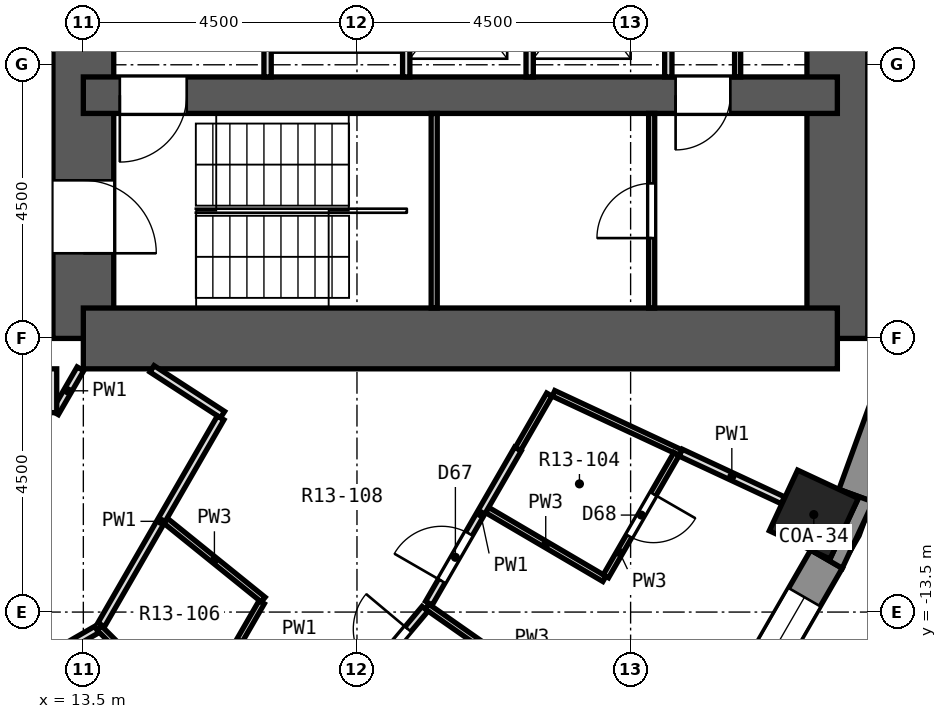
"""IFC4 building model, lengths in metres.
Left out: names, types, materials, properties, quantities, classifications, styles, units other than length and angle.
Written with IfcOpenShell. Run it as: python <this file> out.ifc"""

import sys

from ifc_helpers import new_model, si_unit, direction, frame, frame_2d, origin, origin_2d, place, context, subcontext, project, spatial, polyline, rectangle, outline, extrude, element, fill, save


model = new_model("IFC4")
c1 = context("Model", 3, precision=1e-05, world=origin(), true_north=direction((0.0, 1.0)))
c2 = subcontext(c1, "Body", "Model", "MODEL_VIEW")
j1 = project(units=[si_unit("LENGTHUNIT", "METRE"), si_unit("PLANEANGLEUNIT", "RADIAN")], contexts=[c1])
p1 = place(None, origin())
s1 = spatial("IfcSite", under=j1, at=p1, CompositionType="ELEMENT")
p2 = place(p1, origin())
s2 = spatial("IfcBuilding", under=s1, at=p2, CompositionType="ELEMENT")
p3 = place(p2, frame((0.0, 0.0, 65.9)))
s3 = spatial("IfcBuildingStorey", under=s2, at=p3, CompositionType="ELEMENT", Elevation=65.9)
p4 = place(p3, frame((25.512, -11.897, 0.0), z_axis=(0.0, 0.0, 1.0), x_axis=(0.906307787037, -0.422618261741, 0.0)))
e1 = element("IfcColumn", 1, at=p4, inside=s3, PredefinedType="COLUMN", context=c2, shape_type="SweptSolid", body=[
    extrude(rectangle(XDim=1.1, YDim=1.1, at=origin_2d()), origin(), (0.0, 0.0, 1.0), 3.3),
])
p5 = place(p3, frame((13.5, -9.0, 0.0), z_axis=(0.0, 0.0, 1.0), x_axis=(0.0, 1.0, 0.0)))
e2 = element("IfcWall", 2, at=p5, inside=s3, PredefinedType="SHEAR", context=c2, shape_type="SweptSolid", body=[
    extrude(rectangle(XDim=18.0, YDim=1.0, at=frame_2d((9.0, 0.0))), origin(), (0.0, 0.0, 1.0), 3.3),
])
p6 = place(p5, frame((15.4, 0.0, 0.0)))
e3 = element("IfcOpeningElement", 3, at=p6, cuts=e2, PredefinedType="OPENING", context=c2, shape_type="SweptSolid", body=[
    extrude(rectangle(XDim=1.2, YDim=2.1, at=frame_2d((0.6, 1.05))), frame((0.0, 0.512, 0.0), z_axis=(0.0, -1.0, 0.0), x_axis=(1.0, 0.0, 0.0)), (0.0, 0.0, 1.0), 1.024),
])
p7 = place(p5, frame((1.4, 0.0, 0.0)))
e4 = element("IfcOpeningElement", 4, at=p7, cuts=e2, PredefinedType="OPENING", context=c2, shape_type="SweptSolid", body=[
    extrude(rectangle(XDim=1.2, YDim=2.1, at=frame_2d((0.6, 1.05))), frame((0.0, 0.512, 0.0), z_axis=(0.0, -1.0, 0.0), x_axis=(1.0, 0.0, 0.0)), (0.0, 0.0, 1.0), 1.024),
])
p8 = place(p5, frame((7.5, 0.0, 0.0)))
e5 = element("IfcOpeningElement", 5, at=p8, cuts=e2, PredefinedType="OPENING", context=c2, shape_type="SweptSolid", body=[
    extrude(rectangle(XDim=3.0, YDim=2.4, at=frame_2d((1.5, 1.2))), frame((0.0, 0.512, 0.0), z_axis=(0.0, -1.0, 0.0), x_axis=(1.0, 0.0, 0.0)), (0.0, 0.0, 1.0), 1.024),
])
p9 = place(p3, frame((25.9, -9.0, 0.0), z_axis=(0.0, 0.0, 1.0), x_axis=(0.0, 1.0, 0.0)))
e6 = element("IfcWall", 6, at=p9, inside=s3, PredefinedType="SHEAR", context=c2, shape_type="SweptSolid", body=[
    extrude(rectangle(XDim=18.0, YDim=1.0, at=frame_2d((9.0, 0.0))), origin(), (0.0, 0.0, 1.0), 3.3),
])
p10 = place(p3, frame((13.5, -9.0, 0.0), z_axis=(0.0, 0.0, 1.0), x_axis=(1.0, 0.0, 0.0)))
e7 = element("IfcWall", 7, at=p10, inside=s3, PredefinedType="SHEAR", context=c2, shape_type="SweptSolid", body=[
    extrude(rectangle(XDim=12.4, YDim=1.0, at=frame_2d((6.2, 0.0))), origin(), (0.0, 0.0, 1.0), 3.3),
])
p11 = place(p3, frame((13.5, -5.0, 0.0), z_axis=(0.0, 0.0, 1.0), x_axis=(1.0, 0.0, 0.0)))
e8 = element("IfcWall", 8, at=p11, inside=s3, PredefinedType="SHEAR", context=c2, shape_type="SweptSolid", body=[
    extrude(rectangle(XDim=12.4, YDim=0.6, at=frame_2d((6.2, 0.0))), origin(), (0.0, 0.0, 1.0), 3.3),
])
p12 = place(p11, frame((9.74, 0.0, 0.0)))
e9 = element("IfcOpeningElement", 9, at=p12, cuts=e8, PredefinedType="OPENING", context=c2, shape_type="SweptSolid", body=[
    extrude(rectangle(XDim=0.9, YDim=2.1, at=frame_2d((0.45, 1.05))), frame((0.0, 0.312, 0.0), z_axis=(0.0, -1.0, 0.0), x_axis=(1.0, 0.0, 0.0)), (0.0, 0.0, 1.0), 0.624),
])
p13 = place(p11, frame((0.6, 0.0, 0.0)))
e10 = element("IfcOpeningElement", 10, at=p13, cuts=e8, PredefinedType="OPENING", context=c2, shape_type="SweptSolid", body=[
    extrude(rectangle(XDim=1.1, YDim=2.1, at=frame_2d((0.55, 1.05))), frame((0.0, 0.312, 0.0), z_axis=(0.0, -1.0, 0.0), x_axis=(1.0, 0.0, 0.0)), (0.0, 0.0, 1.0), 0.624),
])
p14 = place(p3, frame((23.798, -15.96, 0.0), z_axis=(0.0, 0.0, 1.0), x_axis=(0.499989888488, 0.86603124159, 0.0)))
e11 = element("IfcWall", 11, at=p14, inside=s3, PredefinedType="SOLIDWALL", context=c2, shape_type="SweptSolid", body=[
    extrude(rectangle(XDim=3.846, YDim=0.6, at=frame_2d((1.923, 0.0))), origin(), (0.0, 0.0, 1.0), 2.75),
])
p15 = place(p14, frame((0.723, 0.0, 0.9)))
e12 = element("IfcOpeningElement", 12, at=p15, cuts=e11, PredefinedType="OPENING", context=c2, shape_type="SweptSolid", body=[
    extrude(rectangle(XDim=2.4, YDim=1.8, at=frame_2d((1.2, 0.9))), frame((0.0, 0.312, 0.0), z_axis=(0.0, -1.0, 0.0), x_axis=(1.0, 0.0, 0.0)), (0.0, 0.0, 1.0), 0.624),
])
p16 = place(p3, frame((26.208, -11.585, 0.0), z_axis=(0.0, 0.0, 1.0), x_axis=(0.342028474173, 0.939689588564, 0.0)))
e13 = element("IfcWall", 13, at=p16, inside=s3, PredefinedType="SOLIDWALL", context=c2, shape_type="SweptSolid", body=[
    extrude(rectangle(XDim=3.846, YDim=0.6, at=frame_2d((1.923, 0.0))), origin(), (0.0, 0.0, 1.0), 2.75),
])
p17 = place(p3, origin())
e14 = element("IfcWall", 14, at=p17, inside=s3, PredefinedType="SOLIDWALL", context=c2, shape_type="SweptSolid", body=[
    extrude(outline(polyline([(26.49, -11.688), (25.926, -11.483), (26.243, -11.631), (25.779, -12.628), (25.461, -12.479), (25.981, -12.78), (26.49, -11.688)])), origin(), (0.0, 0.0, 1.0), 2.75),
])
p18 = place(p3, frame((13.763, -13.763, 0.0), z_axis=(0.0, 0.0, 1.0), x_axis=(0.707106781187, -0.707106781187, 0.0)))
e15 = element("IfcWall", 15, at=p18, inside=s3, PredefinedType="PARTITIONING", context=c2, shape_type="SweptSolid", body=[
    extrude(rectangle(XDim=2.174, YDim=0.1, at=frame_2d((1.087, 0.0))), origin(), (0.0, 0.0, 1.0), 2.75),
])
p19 = place(p3, frame((14.853, -11.999, 0.0), z_axis=(0.0, 0.0, 1.0), x_axis=(0.777974546864, -0.628295793741, 0.0)))
e16 = element("IfcWall", 16, at=p19, inside=s3, PredefinedType="PARTITIONING", context=c2, shape_type="SweptSolid", body=[
    extrude(rectangle(XDim=2.063, YDim=0.1, at=frame_2d((1.032, 0.0))), origin(), (0.0, 0.0, 1.0), 2.75),
])
p20 = place(p3, frame((19.151, -13.409, 0.0), z_axis=(0.0, 0.0, 1.0), x_axis=(0.819242814206, -0.573446781639, 0.0)))
e17 = element("IfcWall", 17, at=p20, inside=s3, PredefinedType="PARTITIONING", context=c2, shape_type="SweptSolid", body=[
    extrude(rectangle(XDim=4.211, YDim=0.1, at=frame_2d((2.106, 0.0))), origin(), (0.0, 0.0, 1.0), 2.75),
])
p21 = place(p3, frame((14.629, -9.5, 0.0), z_axis=(0.0, 0.0, 1.0), x_axis=(0.838830573332, -0.544392569056, 0.0)))
e18 = element("IfcWall", 18, at=p21, inside=s3, PredefinedType="PARTITIONING", context=c2, shape_type="SweptSolid", body=[
    extrude(rectangle(XDim=1.383, YDim=0.125, at=frame_2d((0.691, 0.0))), origin(), (0.0, 0.0, 1.0), 2.75),
])
p22 = place(p3, frame((20.14, -11.822, 0.0), z_axis=(0.0, 0.0, 1.0), x_axis=(0.862374352329, -0.506271149134, 0.0)))
e19 = element("IfcWall", 19, at=p22, inside=s3, PredefinedType="PARTITIONING", context=c2, shape_type="SweptSolid", body=[
    extrude(rectangle(XDim=2.237, YDim=0.1, at=frame_2d((1.119, 0.0))), origin(), (0.0, 0.0, 1.0), 2.75),
])
p23 = place(p3, frame((21.232, -9.903, 0.0), z_axis=(0.0, 0.0, 1.0), x_axis=(0.906274952778, -0.422688667896, 0.0)))
e20 = element("IfcWall", 20, at=p23, inside=s3, PredefinedType="PARTITIONING", context=c2, shape_type="SweptSolid", body=[
    extrude(rectangle(XDim=2.309, YDim=0.1, at=frame_2d((1.155, 0.0))), origin(), (0.0, 0.0, 1.0), 2.75),
])
p24 = place(p3, frame((23.325, -10.879, 0.0), z_axis=(0.0, 0.0, 1.0), x_axis=(0.906348054162, -0.422531897869, 0.0)))
e21 = element("IfcWall", 21, at=p24, inside=s3, PredefinedType="PARTITIONING", context=c2, shape_type="SweptSolid", body=[
    extrude(rectangle(XDim=1.853, YDim=0.125, at=frame_2d((0.926, 0.0))), origin(), (0.0, 0.0, 1.0), 2.75),
])
p25 = place(p3, frame((5.102, -18.762, 0.0), z_axis=(0.0, 0.0, 1.0), x_axis=(0.866071189182, 0.499920688979, 0.0)))
e22 = element("IfcWall", 22, at=p25, inside=s3, PredefinedType="PARTITIONING", context=c2, shape_type="SweptSolid", body=[
    extrude(rectangle(XDim=9.95, YDim=0.125, at=frame_2d((4.975, 0.0))), origin(), (0.0, 0.0, 1.0), 2.75),
])
p26 = place(p25, frame((2.932, 0.0, 0.0)))
e23 = element("IfcOpeningElement", 23, at=p26, cuts=e22, PredefinedType="OPENING", context=c2, shape_type="SweptSolid", body=[
    extrude(rectangle(XDim=1.0, YDim=2.1, at=frame_2d((0.5, 1.05))), frame((0.0, 0.074, 0.0), z_axis=(0.0, -1.0, 0.0), x_axis=(1.0, 0.0, 0.0)), (0.0, 0.0, 1.0), 0.149),
])
p27 = place(p3, frame((17.573, -15.291, 0.0), z_axis=(0.0, 0.0, 1.0), x_axis=(0.642616104492, 0.766188320354, 0.0)))
e24 = element("IfcWall", 24, at=p27, inside=s3, PredefinedType="PARTITIONING", context=c2, shape_type="SweptSolid", body=[
    extrude(rectangle(XDim=2.406, YDim=0.125, at=frame_2d((1.203, 0.0))), origin(), (0.0, 0.0, 1.0), 2.75),
])
p28 = place(p27, frame((1.071, 0.0, 0.0)))
e25 = element("IfcOpeningElement", 25, at=p28, cuts=e24, PredefinedType="OPENING", context=c2, shape_type="SweptSolid", body=[
    extrude(rectangle(XDim=0.9, YDim=2.1, at=frame_2d((0.45, 1.05))), frame((0.0, 0.074, 0.0), z_axis=(0.0, -1.0, 0.0), x_axis=(1.0, 0.0, 0.0)), (0.0, 0.0, 1.0), 0.149),
])
p29 = place(p3, frame((22.094, -12.911, 0.0), z_axis=(0.0, 0.0, 1.0), x_axis=(0.500223263977, 0.865896463889, 0.0)))
e26 = element("IfcWall", 26, at=p29, inside=s3, PredefinedType="PARTITIONING", context=c2, shape_type="SweptSolid", body=[
    extrude(rectangle(XDim=2.321, YDim=0.1, at=frame_2d((1.16, 0.0))), origin(), (0.0, 0.0, 1.0), 2.75),
])
p30 = place(p29, frame((0.761, 0.0, 0.0)))
e27 = element("IfcOpeningElement", 27, at=p30, cuts=e26, PredefinedType="OPENING", context=c2, shape_type="SweptSolid", body=[
    extrude(rectangle(XDim=0.8, YDim=2.1, at=frame_2d((0.4, 1.05))), frame((0.0, 0.062, 0.0), z_axis=(0.0, -1.0, 0.0), x_axis=(1.0, 0.0, 0.0)), (0.0, 0.0, 1.0), 0.124),
])
p31 = place(p3, frame((20.646, -10.819, 0.0), z_axis=(0.0, 0.0, 1.0), x_axis=(0.499797427156, 0.866142327685, 0.0)))
e28 = element("IfcWall", 28, at=p31, inside=s3, PredefinedType="PARTITIONING", context=c2, shape_type="SweptSolid", body=[
    extrude(rectangle(XDim=1.034, YDim=0.1, at=frame_2d((0.517, 0.0))), origin(), (0.0, 0.0, 1.0), 2.75),
])
p32 = place(p3, frame((19.182, -13.355, 0.0), z_axis=(0.0, 0.0, 1.0), x_axis=(0.500092867575, 0.865971780025, 0.0)))
e29 = element("IfcWall", 29, at=p32, inside=s3, PredefinedType="PARTITIONING", context=c2, shape_type="SweptSolid", body=[
    extrude(rectangle(XDim=2.929, YDim=0.125, at=frame_2d((1.464, 0.0))), origin(), (0.0, 0.0, 1.0), 2.75),
])
p33 = place(p32, frame((0.422, 0.0, 0.0)))
e30 = element("IfcOpeningElement", 30, at=p33, cuts=e29, PredefinedType="OPENING", context=c2, shape_type="SweptSolid", body=[
    extrude(rectangle(XDim=0.9, YDim=2.1, at=frame_2d((0.45, 1.05))), frame((0.0, 0.074, 0.0), z_axis=(0.0, -1.0, 0.0), x_axis=(1.0, 0.0, 0.0)), (0.0, 0.0, 1.0), 0.149),
])
p34 = place(p3, frame((15.325, -15.257, 0.0), z_axis=(0.0, 0.0, 1.0), x_axis=(0.500228022419, 0.865893714948, 0.0)))
e31 = element("IfcWall", 31, at=p34, inside=s3, PredefinedType="PARTITIONING", context=c2, shape_type="SweptSolid", body=[
    extrude(rectangle(XDim=2.215, YDim=0.1, at=frame_2d((1.108, 0.0))), origin(), (0.0, 0.0, 1.0), 2.75),
])
p35 = place(p34, frame((0.708, 0.0, 0.0)))
e32 = element("IfcOpeningElement", 32, at=p35, cuts=e31, PredefinedType="OPENING", context=c2, shape_type="SweptSolid", body=[
    extrude(rectangle(XDim=0.8, YDim=2.1, at=frame_2d((0.4, 1.05))), frame((0.0, 0.062, 0.0), z_axis=(0.0, -1.0, 0.0), x_axis=(1.0, 0.0, 0.0)), (0.0, 0.0, 1.0), 0.124),
])
p36 = place(p3, frame((13.794, -13.709, 0.0), z_axis=(0.0, 0.0, 1.0), x_axis=(0.499916150712, 0.866073808781, 0.0)))
e33 = element("IfcWall", 33, at=p36, inside=s3, PredefinedType="PARTITIONING", context=c2, shape_type="SweptSolid", body=[
    extrude(rectangle(XDim=3.928, YDim=0.125, at=frame_2d((1.964, 0.0))), origin(), (0.0, 0.0, 1.0), 2.75),
])
p37 = place(p3, frame((13.035, -10.222, 0.0), z_axis=(0.0, 0.0, 1.0), x_axis=(0.49991670217, 0.866073490468, 0.0)))
e34 = element("IfcWall", 34, at=p37, inside=s3, PredefinedType="PARTITIONING", context=c2, shape_type="SweptSolid", body=[
    extrude(rectangle(XDim=0.834, YDim=0.125, at=frame_2d((0.417, 0.0))), origin(), (0.0, 0.0, 1.0), 2.75),
])
p38 = place(p3, frame((13.0, -10.22, 0.0), z_axis=(0.0, 0.0, 1.0), x_axis=(0.0, 1.0, 0.0)))
e35 = element("IfcWall", 35, at=p38, inside=s3, PredefinedType="PARTITIONING", context=c2, shape_type="SweptSolid", body=[
    extrude(rectangle(XDim=0.72, YDim=0.125, at=frame_2d((0.36, 0.0))), origin(), (0.0, 0.0, 1.0), 2.75),
])
p39 = place(p3, frame((16.53, -4.7, 0.0), z_axis=(0.0, 0.0, 1.0), x_axis=(0.0, 1.0, 0.0)))
e36 = element("IfcWall", 36, at=p39, inside=s3, PredefinedType="PARTITIONING", context=c2, shape_type="SweptSolid", body=[
    extrude(rectangle(XDim=2.4, YDim=0.12, at=frame_2d((1.2, 0.0))), origin(), (0.0, 0.0, 1.0), 2.75),
])
p40 = place(p39, frame((0.65, 0.0, 0.0)))
e37 = element("IfcOpeningElement", 37, at=p40, cuts=e36, PredefinedType="OPENING", context=c2, shape_type="SweptSolid", body=[
    extrude(rectangle(XDim=1.1, YDim=2.1, at=frame_2d((0.55, 1.05))), frame((0.0, 0.072, 0.0), z_axis=(0.0, -1.0, 0.0), x_axis=(1.0, 0.0, 0.0)), (0.0, 0.0, 1.0), 0.144),
])
for number, where, z_axis, x_axis in (
    (38, (18.81, -4.7, 0.0), (0.0, 0.0, 1.0), (0.0, 1.0, 0.0)),
    (39, (20.84, -4.7, 0.0), (0.0, 0.0, 1.0), (0.0, 1.0, 0.0)),
    (40, (23.12, -4.7, 0.0), (0.0, 0.0, 1.0), (0.0, 1.0, 0.0)),
):
    element("IfcWall", number, at=place(p3, frame(where, z_axis=z_axis, x_axis=x_axis)), inside=s3, PredefinedType="PARTITIONING", context=c2, shape_type="SweptSolid", body=[
        extrude(rectangle(XDim=2.4, YDim=0.12, at=frame_2d((1.2, 0.0))), origin(), (0.0, 0.0, 1.0), 2.75),
    ])
p41 = place(p3, frame((24.26, -4.7, 0.0), z_axis=(0.0, 0.0, 1.0), x_axis=(0.0, 1.0, 0.0)))
e41 = element("IfcWall", 41, at=p41, inside=s3, PredefinedType="PARTITIONING", context=c2, shape_type="SweptSolid", body=[
    extrude(rectangle(XDim=2.4, YDim=0.1, at=frame_2d((1.2, 0.0))), origin(), (0.0, 0.0, 1.0), 2.75),
])
p42 = place(p3, frame((19.27, -8.5, 0.0), z_axis=(0.0, 0.0, 1.0), x_axis=(0.0, 1.0, 0.0)))
e42 = element("IfcWall", 42, at=p42, inside=s3, PredefinedType="PARTITIONING", context=c2, shape_type="SweptSolid", body=[
    extrude(rectangle(XDim=3.2, YDim=0.1, at=frame_2d((1.6, 0.0))), origin(), (0.0, 0.0, 1.0), 2.75),
])
p43 = place(p3, frame((22.846, -8.5, 0.0), z_axis=(0.0, 0.0, 1.0), x_axis=(0.0, 1.0, 0.0)))
e43 = element("IfcWall", 43, at=p43, inside=s3, PredefinedType="PARTITIONING", context=c2, shape_type="SweptSolid", body=[
    extrude(rectangle(XDim=3.2, YDim=0.1, at=frame_2d((1.6, 0.0))), origin(), (0.0, 0.0, 1.0), 2.75),
])
p44 = place(p43, frame((1.15, 0.0, 0.0)))
e44 = element("IfcOpeningElement", 44, at=p44, cuts=e43, PredefinedType="OPENING", context=c2, shape_type="SweptSolid", body=[
    extrude(rectangle(XDim=0.9, YDim=2.1, at=frame_2d((0.45, 1.05))), frame((0.0, 0.062, 0.0), z_axis=(0.0, -1.0, 0.0), x_axis=(1.0, 0.0, 0.0)), (0.0, 0.0, 1.0), 0.124),
])
p45 = place(p15, origin())
e45 = element("IfcWindow", 45, at=p45, inside=s3, PartitioningType="SINGLE_PANEL", PredefinedType="WINDOW", context=c2, shape_type="SweptSolid", body=[
    extrude(rectangle(XDim=2.4, YDim=1.8, at=frame_2d((1.2, 0.9))), frame((0.0, 0.18, 0.0), z_axis=(0.0, -1.0, 0.0), x_axis=(1.0, 0.0, 0.0)), (0.0, 0.0, 1.0), 0.06),
])
fill(e12, e45)
p46 = place(p35, frame((0.8, 0.0, 0.0), z_axis=(0.0, 0.0, 1.0), x_axis=(-1.0, 0.0, 0.0)))
e46 = element("IfcDoor", 46, at=p46, inside=s3, OperationType="SINGLE_SWING_LEFT", PredefinedType="DOOR", context=c2, shape_type="SweptSolid", body=[
    extrude(rectangle(XDim=0.8, YDim=2.1, at=frame_2d((0.4, 1.05))), frame((0.0, 0.025, 0.0), z_axis=(0.0, -1.0, 0.0), x_axis=(1.0, 0.0, 0.0)), (0.0, 0.0, 1.0), 0.05),
])
fill(e32, e46)
p47 = place(p28, origin())
e47 = element("IfcDoor", 47, at=p47, inside=s3, OperationType="SINGLE_SWING_RIGHT", PredefinedType="DOOR", context=c2, shape_type="SweptSolid", body=[
    extrude(rectangle(XDim=0.9, YDim=2.1, at=frame_2d((0.45, 1.05))), frame((0.0, 0.025, 0.0), z_axis=(0.0, -1.0, 0.0), x_axis=(1.0, 0.0, 0.0)), (0.0, 0.0, 1.0), 0.05),
])
fill(e25, e47)
p48 = place(p33, origin())
e48 = element("IfcDoor", 48, at=p48, inside=s3, OperationType="SINGLE_SWING_LEFT", PredefinedType="DOOR", context=c2, shape_type="SweptSolid", body=[
    extrude(rectangle(XDim=0.9, YDim=2.1, at=frame_2d((0.45, 1.05))), frame((0.0, 0.025, 0.0), z_axis=(0.0, -1.0, 0.0), x_axis=(1.0, 0.0, 0.0)), (0.0, 0.0, 1.0), 0.05),
])
fill(e30, e48)
p49 = place(p30, frame((0.8, 0.0, 0.0), z_axis=(0.0, 0.0, 1.0), x_axis=(-1.0, 0.0, 0.0)))
e49 = element("IfcDoor", 49, at=p49, inside=s3, OperationType="SINGLE_SWING_LEFT", PredefinedType="DOOR", context=c2, shape_type="SweptSolid", body=[
    extrude(rectangle(XDim=0.8, YDim=2.1, at=frame_2d((0.4, 1.05))), frame((0.0, 0.025, 0.0), z_axis=(0.0, -1.0, 0.0), x_axis=(1.0, 0.0, 0.0)), (0.0, 0.0, 1.0), 0.05),
])
fill(e27, e49)
p50 = place(p44, origin())
e50 = element("IfcDoor", 50, at=p50, inside=s3, OperationType="SINGLE_SWING_LEFT", PredefinedType="DOOR", context=c2, shape_type="SweptSolid", body=[
    extrude(rectangle(XDim=0.9, YDim=2.1, at=frame_2d((0.45, 1.05))), frame((0.0, 0.025, 0.0), z_axis=(0.0, -1.0, 0.0), x_axis=(1.0, 0.0, 0.0)), (0.0, 0.0, 1.0), 0.05),
])
fill(e44, e50)
p51 = place(p12, frame((0.9, 0.0, 0.0), z_axis=(0.0, 0.0, 1.0), x_axis=(-1.0, 0.0, 0.0)))
e51 = element("IfcDoor", 51, at=p51, inside=s3, OperationType="SINGLE_SWING_RIGHT", PredefinedType="DOOR", context=c2, shape_type="SweptSolid", body=[
    extrude(rectangle(XDim=0.9, YDim=2.1, at=frame_2d((0.45, 1.05))), frame((0.0, 0.025, 0.0), z_axis=(0.0, -1.0, 0.0), x_axis=(1.0, 0.0, 0.0)), (0.0, 0.0, 1.0), 0.05),
])
fill(e9, e51)
p52 = place(p13, frame((1.1, 0.0, 0.0), z_axis=(0.0, 0.0, 1.0), x_axis=(-1.0, 0.0, 0.0)))
e52 = element("IfcDoor", 52, at=p52, inside=s3, OperationType="SINGLE_SWING_RIGHT", PredefinedType="DOOR", context=c2, shape_type="SweptSolid", body=[
    extrude(rectangle(XDim=1.1, YDim=2.1, at=frame_2d((0.55, 1.05))), frame((0.0, 0.025, 0.0), z_axis=(0.0, -1.0, 0.0), x_axis=(1.0, 0.0, 0.0)), (0.0, 0.0, 1.0), 0.05),
])
fill(e10, e52)
p53 = place(p7, frame((1.2, 0.0, 0.0), z_axis=(0.0, 0.0, 1.0), x_axis=(-1.0, 0.0, 0.0)))
e53 = element("IfcDoor", 53, at=p53, inside=s3, OperationType="SINGLE_SWING_RIGHT", PredefinedType="DOOR", context=c2, shape_type="SweptSolid", body=[
    extrude(rectangle(XDim=1.2, YDim=2.1, at=frame_2d((0.6, 1.05))), frame((0.0, 0.025, 0.0), z_axis=(0.0, -1.0, 0.0), x_axis=(1.0, 0.0, 0.0)), (0.0, 0.0, 1.0), 0.05),
])
fill(e4, e53)
save(model, sys.argv[1])
